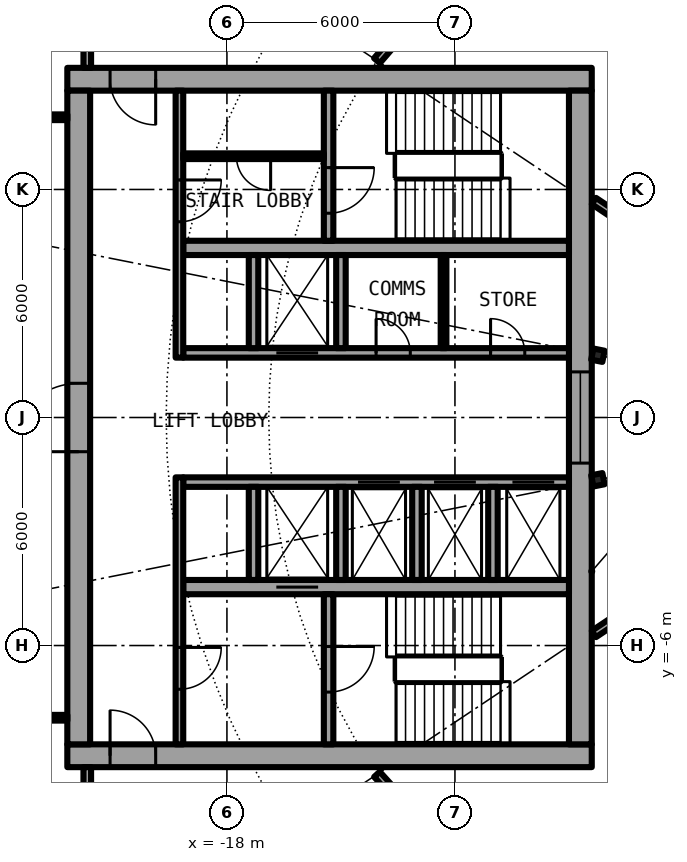
"""IFC4 building model, lengths in metres.
Left out: names, types, materials, properties, quantities, classifications, styles, units other than length and angle.
Written with IfcOpenShell. Run it as: python <this file> out.ifc"""

import sys

from ifc_helpers import new_model, si_unit, direction, frame, frame_2d, origin, origin_2d, place, context, subcontext, project, spatial, rectangle, i_section, extrude, element, fill, save


model = new_model("IFC4")
c1 = context("Model", 3, precision=1e-05, world=origin(), true_north=direction((0.0, 1.0)))
c2 = subcontext(c1, "Body", "Model", "MODEL_VIEW")
j1 = project(units=[si_unit("LENGTHUNIT", "METRE"), si_unit("PLANEANGLEUNIT", "RADIAN")], contexts=[c1])
p1 = place(None, origin())
s1 = spatial("IfcSite", under=j1, at=p1, CompositionType="ELEMENT")
p2 = place(p1, origin())
s2 = spatial("IfcBuilding", under=s1, at=p2, CompositionType="ELEMENT")
p3 = place(p2, frame((0.0, 0.0, 107.45)))
s3 = spatial("IfcBuildingStorey", under=s2, at=p3, CompositionType="ELEMENT", Elevation=107.45)
for number, where, z_axis, x_axis in (
    (1, (-8.239, 1.639, 0.0), (0.0, 0.0, 1.0), (-0.981, 0.195, 0.0)),
    (2, (-8.239, -1.639, 0.0), (0.0, 0.0, 1.0), (-0.981, -0.195, 0.0)),
):
    element("IfcColumn", number, at=place(p3, frame(where, z_axis=z_axis, x_axis=x_axis)), inside=s3, PredefinedType="COLUMN", context=c2, shape_type="SweptSolid", body=[
        extrude(i_section(OverallWidth=0.3, OverallDepth=0.3, WebThickness=0.011, FlangeThickness=0.019, FilletRadius=0.027, at=origin_2d()), origin(), (0.0, 0.0, 1.0), 4.2),
    ])
p4 = place(p3, frame((-22.2, -8.9, 0.0), z_axis=(0.0, 0.0, 1.0), x_axis=(1.0, 0.0, 0.0)))
e3 = element("IfcWall", 3, at=p4, inside=s3, PredefinedType="SHEAR", context=c2, shape_type="SweptSolid", body=[
    extrude(rectangle(XDim=13.8, YDim=0.6, at=frame_2d((6.9, 0.0))), origin(), (0.0, 0.0, 1.0), 4.2),
])
p5 = place(p4, frame((1.125, 0.0, 0.0)))
e4 = element("IfcOpeningElement", 4, at=p5, cuts=e3, PredefinedType="OPENING", context=c2, shape_type="SweptSolid", body=[
    extrude(rectangle(XDim=1.2, YDim=2.3, at=frame_2d((0.6, 1.15))), frame((0.0, 0.31, 0.0), z_axis=(0.0, -1.0, 0.0), x_axis=(1.0, 0.0, 0.0)), (0.0, 0.0, 1.0), 0.62),
])
p6 = place(p3, frame((-8.4, 8.9, 0.0), z_axis=(0.0, 0.0, 1.0), x_axis=(-1.0, 0.0, 0.0)))
e5 = element("IfcWall", 5, at=p6, inside=s3, PredefinedType="SHEAR", context=c2, shape_type="SweptSolid", body=[
    extrude(rectangle(XDim=13.8, YDim=0.6, at=frame_2d((6.9, 0.0))), origin(), (0.0, 0.0, 1.0), 4.2),
])
p7 = place(p6, frame((11.475, 0.0, 0.0)))
e6 = element("IfcOpeningElement", 6, at=p7, cuts=e5, PredefinedType="OPENING", context=c2, shape_type="SweptSolid", body=[
    extrude(rectangle(XDim=1.2, YDim=2.3, at=frame_2d((0.6, 1.15))), frame((0.0, 0.31, 0.0), z_axis=(0.0, -1.0, 0.0), x_axis=(1.0, 0.0, 0.0)), (0.0, 0.0, 1.0), 0.62),
])
p8 = place(p3, frame((-21.9, -8.6, 0.0), z_axis=(0.0, 0.0, 1.0), x_axis=(0.0, 1.0, 0.0)))
e7 = element("IfcWall", 7, at=p8, inside=s3, PredefinedType="SHEAR", context=c2, shape_type="SweptSolid", body=[
    extrude(rectangle(XDim=17.2, YDim=0.6, at=frame_2d((8.6, 0.0))), origin(), (0.0, 0.0, 1.0), 4.2),
])
p9 = place(p8, frame((7.7, 0.0, 0.0)))
e8 = element("IfcOpeningElement", 8, at=p9, cuts=e7, PredefinedType="OPENING", context=c2, shape_type="SweptSolid", body=[
    extrude(rectangle(XDim=1.8, YDim=2.3, at=frame_2d((0.9, 1.15))), frame((0.0, 0.31, 0.0), z_axis=(0.0, -1.0, 0.0), x_axis=(1.0, 0.0, 0.0)), (0.0, 0.0, 1.0), 0.62),
])
p10 = place(p3, frame((-8.7, 8.6, 0.0), z_axis=(0.0, 0.0, 1.0), x_axis=(0.0, -1.0, 0.0)))
e9 = element("IfcWall", 9, at=p10, inside=s3, PredefinedType="SHEAR", context=c2, shape_type="SweptSolid", body=[
    extrude(rectangle(XDim=17.2, YDim=0.6, at=frame_2d((8.6, 0.0))), origin(), (0.0, 0.0, 1.0), 4.2),
])
p11 = place(p10, frame((7.4, 0.0, 0.1)))
e10 = element("IfcOpeningElement", 10, at=p11, cuts=e9, PredefinedType="OPENING", context=c2, shape_type="SweptSolid", body=[
    extrude(rectangle(XDim=2.4, YDim=2.2, at=frame_2d((1.2, 1.1))), frame((0.0, 0.31, 0.0), z_axis=(0.0, -1.0, 0.0), x_axis=(1.0, 0.0, 0.0)), (0.0, 0.0, 1.0), 0.62),
])
p12 = place(p3, frame((-9.0, -1.7, 0.0), z_axis=(0.0, 0.0, 1.0), x_axis=(-1.0, 0.0, 0.0)))
e11 = element("IfcWall", 11, at=p12, inside=s3, PredefinedType="SHEAR", context=c2, shape_type="SweptSolid", body=[
    extrude(rectangle(XDim=10.15, YDim=0.25, at=frame_2d((5.075, 0.0))), origin(), (0.0, 0.0, 1.0), 4.2),
])
p13 = place(p12, frame((0.387, 0.0, 0.0)))
e12 = element("IfcOpeningElement", 12, at=p13, cuts=e11, PredefinedType="OPENING", context=c2, shape_type="SweptSolid", body=[
    extrude(rectangle(XDim=1.1, YDim=2.3, at=frame_2d((0.55, 1.15))), frame((0.0, 0.135, 0.0), z_axis=(0.0, -1.0, 0.0), x_axis=(1.0, 0.0, 0.0)), (0.0, 0.0, 1.0), 0.27),
])
p14 = place(p12, frame((2.45, 0.0, 0.0)))
e13 = element("IfcOpeningElement", 13, at=p14, cuts=e11, PredefinedType="OPENING", context=c2, shape_type="SweptSolid", body=[
    extrude(rectangle(XDim=1.1, YDim=2.3, at=frame_2d((0.55, 1.15))), frame((0.0, 0.135, 0.0), z_axis=(0.0, -1.0, 0.0), x_axis=(1.0, 0.0, 0.0)), (0.0, 0.0, 1.0), 0.27),
])
p15 = place(p12, frame((4.45, 0.0, 0.0)))
e14 = element("IfcOpeningElement", 14, at=p15, cuts=e11, PredefinedType="OPENING", context=c2, shape_type="SweptSolid", body=[
    extrude(rectangle(XDim=1.1, YDim=2.3, at=frame_2d((0.55, 1.15))), frame((0.0, 0.135, 0.0), z_axis=(0.0, -1.0, 0.0), x_axis=(1.0, 0.0, 0.0)), (0.0, 0.0, 1.0), 0.27),
])
p16 = place(p3, frame((-9.0, -4.462, 0.0), z_axis=(0.0, 0.0, 1.0), x_axis=(-1.0, 0.0, 0.0)))
e15 = element("IfcWall", 15, at=p16, inside=s3, PredefinedType="SHEAR", context=c2, shape_type="SweptSolid", body=[
    extrude(rectangle(XDim=10.15, YDim=0.375, at=frame_2d((5.075, 0.0))), origin(), (0.0, 0.0, 1.0), 4.2),
])
p17 = place(p16, frame((6.6, 0.0, 0.0)))
e16 = element("IfcOpeningElement", 16, at=p17, cuts=e15, PredefinedType="OPENING", context=c2, shape_type="SweptSolid", body=[
    extrude(rectangle(XDim=1.1, YDim=2.3, at=frame_2d((0.55, 1.15))), frame((0.0, 0.198, 0.0), z_axis=(0.0, -1.0, 0.0), x_axis=(1.0, 0.0, 0.0)), (0.0, 0.0, 1.0), 0.395),
])
p18 = place(p3, frame((-15.325, -4.65, 0.0), z_axis=(0.0, 0.0, 1.0), x_axis=(0.0, -1.0, 0.0)))
e17 = element("IfcWall", 17, at=p18, inside=s3, PredefinedType="SHEAR", context=c2, shape_type="SweptSolid", body=[
    extrude(rectangle(XDim=3.95, YDim=0.25, at=frame_2d((1.975, 0.0))), origin(), (0.0, 0.0, 1.0), 4.2),
])
p19 = place(p18, frame((1.375, 0.0, 0.0)))
e18 = element("IfcOpeningElement", 18, at=p19, cuts=e17, PredefinedType="OPENING", context=c2, shape_type="SweptSolid", body=[
    extrude(rectangle(XDim=1.2, YDim=2.3, at=frame_2d((0.6, 1.15))), frame((0.0, 0.135, 0.0), z_axis=(0.0, -1.0, 0.0), x_axis=(1.0, 0.0, 0.0)), (0.0, 0.0, 1.0), 0.27),
])
for number, where, z_axis, x_axis in (
    (19, (-15.0, -1.825, 0.0), (0.0, 0.0, 1.0), (0.0, -1.0, 0.0)),
    (20, (-17.3, -1.825, 0.0), (0.0, 0.0, 1.0), (0.0, -1.0, 0.0)),
):
    element("IfcWall", number, at=place(p3, frame(where, z_axis=z_axis, x_axis=x_axis)), inside=s3, PredefinedType="SOLIDWALL", context=c2, shape_type="SweptSolid", body=[
        extrude(rectangle(XDim=2.45, YDim=0.25, at=frame_2d((1.225, 0.0))), origin(), (0.0, 0.0, 1.0), 3.85),
    ])
p20 = place(p3, frame((-19.25, -1.575, 0.0), z_axis=(0.0, 0.0, 1.0), x_axis=(0.0, -1.0, 0.0)))
e21 = element("IfcWall", 21, at=p20, inside=s3, PredefinedType="SOLIDWALL", context=c2, shape_type="SweptSolid", body=[
    extrude(rectangle(XDim=7.025, YDim=0.2, at=frame_2d((3.513, 0.0))), origin(), (0.0, 0.0, 1.0), 3.85),
])
p21 = place(p20, frame((4.475, 0.0, 0.0)))
e22 = element("IfcOpeningElement", 22, at=p21, cuts=e21, PredefinedType="OPENING", context=c2, shape_type="SweptSolid", body=[
    extrude(rectangle(XDim=1.1, YDim=2.3, at=frame_2d((0.55, 1.15))), frame((0.0, 0.11, 0.0), z_axis=(0.0, -1.0, 0.0), x_axis=(1.0, 0.0, 0.0)), (0.0, 0.0, 1.0), 0.22),
])
p22 = place(p3, frame((-19.15, 1.7, 0.0), z_axis=(0.0, 0.0, 1.0), x_axis=(1.0, 0.0, 0.0)))
e23 = element("IfcWall", 23, at=p22, inside=s3, PredefinedType="SHEAR", context=c2, shape_type="SweptSolid", body=[
    extrude(rectangle(XDim=10.15, YDim=0.25, at=frame_2d((5.075, 0.0))), origin(), (0.0, 0.0, 1.0), 4.2),
])
p23 = place(p22, frame((2.45, 0.0, 0.0)))
e24 = element("IfcOpeningElement", 24, at=p23, cuts=e23, PredefinedType="OPENING", context=c2, shape_type="SweptSolid", body=[
    extrude(rectangle(XDim=1.1, YDim=2.3, at=frame_2d((0.55, 1.15))), frame((0.0, 0.135, 0.0), z_axis=(0.0, -1.0, 0.0), x_axis=(1.0, 0.0, 0.0)), (0.0, 0.0, 1.0), 0.27),
])
p24 = place(p22, frame((8.087, 0.0, 0.0)))
e25 = element("IfcOpeningElement", 25, at=p24, cuts=e23, PredefinedType="OPENING", context=c2, shape_type="SweptSolid", body=[
    extrude(rectangle(XDim=0.9, YDim=2.3, at=frame_2d((0.45, 1.15))), frame((0.0, 0.135, 0.0), z_axis=(0.0, -1.0, 0.0), x_axis=(1.0, 0.0, 0.0)), (0.0, 0.0, 1.0), 0.27),
])
p25 = place(p22, frame((5.075, 0.0, 0.0)))
e26 = element("IfcOpeningElement", 26, at=p25, cuts=e23, PredefinedType="OPENING", context=c2, shape_type="SweptSolid", body=[
    extrude(rectangle(XDim=0.9, YDim=2.3, at=frame_2d((0.45, 1.15))), frame((0.0, 0.135, 0.0), z_axis=(0.0, -1.0, 0.0), x_axis=(1.0, 0.0, 0.0)), (0.0, 0.0, 1.0), 0.27),
])
p26 = place(p3, frame((-9.0, 4.462, 0.0), z_axis=(0.0, 0.0, 1.0), x_axis=(-1.0, 0.0, 0.0)))
e27 = element("IfcWall", 27, at=p26, inside=s3, PredefinedType="SHEAR", context=c2, shape_type="SweptSolid", body=[
    extrude(rectangle(XDim=10.15, YDim=0.375, at=frame_2d((5.075, 0.0))), origin(), (0.0, 0.0, 1.0), 4.2),
])
p27 = place(p3, frame((-15.325, 8.6, 0.0), z_axis=(0.0, 0.0, 1.0), x_axis=(0.0, -1.0, 0.0)))
e28 = element("IfcWall", 28, at=p27, inside=s3, PredefinedType="SHEAR", context=c2, shape_type="SweptSolid", body=[
    extrude(rectangle(XDim=3.95, YDim=0.25, at=frame_2d((1.975, 0.0))), origin(), (0.0, 0.0, 1.0), 4.2),
])
p28 = place(p27, frame((2.025, 0.0, 0.0)))
e29 = element("IfcOpeningElement", 29, at=p28, cuts=e28, PredefinedType="OPENING", context=c2, shape_type="SweptSolid", body=[
    extrude(rectangle(XDim=1.2, YDim=2.3, at=frame_2d((0.6, 1.15))), frame((0.0, 0.135, 0.0), z_axis=(0.0, -1.0, 0.0), x_axis=(1.0, 0.0, 0.0)), (0.0, 0.0, 1.0), 0.27),
])
for number, where, z_axis, x_axis in (
    (30, (-15.0, 1.825, 0.0), (0.0, 0.0, 1.0), (0.0, 1.0, 0.0)),
    (31, (-17.3, 1.825, 0.0), (0.0, 0.0, 1.0), (0.0, 1.0, 0.0)),
):
    element("IfcWall", number, at=place(p3, frame(where, z_axis=z_axis, x_axis=x_axis)), inside=s3, PredefinedType="SOLIDWALL", context=c2, shape_type="SweptSolid", body=[
        extrude(rectangle(XDim=2.45, YDim=0.25, at=frame_2d((1.225, 0.0))), origin(), (0.0, 0.0, 1.0), 3.85),
    ])
p29 = place(p3, frame((-19.25, 8.6, 0.0), z_axis=(0.0, 0.0, 1.0), x_axis=(0.0, -1.0, 0.0)))
e32 = element("IfcWall", 32, at=p29, inside=s3, PredefinedType="SOLIDWALL", context=c2, shape_type="SweptSolid", body=[
    extrude(rectangle(XDim=7.025, YDim=0.2, at=frame_2d((3.513, 0.0))), origin(), (0.0, 0.0, 1.0), 3.85),
])
p30 = place(p29, frame((2.35, 0.0, 0.0)))
e33 = element("IfcOpeningElement", 33, at=p30, cuts=e32, PredefinedType="OPENING", context=c2, shape_type="SweptSolid", body=[
    extrude(rectangle(XDim=1.1, YDim=2.3, at=frame_2d((0.55, 1.15))), frame((0.0, 0.11, 0.0), z_axis=(0.0, -1.0, 0.0), x_axis=(1.0, 0.0, 0.0)), (0.0, 0.0, 1.0), 0.22),
])
for number, where, z_axis, x_axis in (
    (34, (-11.0, -1.825, 0.0), (0.0, 0.0, 1.0), (0.0, -1.0, 0.0)),
    (35, (-13.0, -1.825, 0.0), (0.0, 0.0, 1.0), (0.0, -1.0, 0.0)),
):
    element("IfcWall", number, at=place(p3, frame(where, z_axis=z_axis, x_axis=x_axis)), inside=s3, PredefinedType="SOLIDWALL", context=c2, shape_type="SweptSolid", body=[
        extrude(rectangle(XDim=2.45, YDim=0.25, at=frame_2d((1.225, 0.0))), origin(), (0.0, 0.0, 1.0), 3.85),
    ])
p31 = place(p3, frame((-12.3, 1.825, 0.0), z_axis=(0.0, 0.0, 1.0), x_axis=(0.0, 1.0, 0.0)))
e36 = element("IfcWall", 36, at=p31, inside=s3, PredefinedType="PARTITIONING", context=c2, shape_type="SweptSolid", body=[
    extrude(rectangle(XDim=2.45, YDim=0.15, at=frame_2d((1.225, 0.0))), origin(), (0.0, 0.0, 1.0), 3.85),
])
p32 = place(p3, frame((-15.45, 6.875, 0.0), z_axis=(0.0, 0.0, 1.0), x_axis=(-1.0, 0.0, 0.0)))
e37 = element("IfcWall", 37, at=p32, inside=s3, PredefinedType="PARTITIONING", context=c2, shape_type="SweptSolid", body=[
    extrude(rectangle(XDim=3.7, YDim=0.15, at=frame_2d((1.85, 0.0))), origin(), (0.0, 0.0, 1.0), 3.85),
])
p33 = place(p32, frame((1.4, 0.0, 0.0)))
e38 = element("IfcOpeningElement", 38, at=p33, cuts=e37, PredefinedType="OPENING", context=c2, shape_type="SweptSolid", body=[
    extrude(rectangle(XDim=0.9, YDim=2.3, at=frame_2d((0.45, 1.15))), frame((0.0, 0.085, 0.0), z_axis=(0.0, -1.0, 0.0), x_axis=(1.0, 0.0, 0.0)), (0.0, 0.0, 1.0), 0.17),
])
for number, where, z_axis, x_axis in (
    (39, (-22.2, 7.9, 0.0), (0.0, 0.0, 1.0), (-1.0, 0.0, 0.0)),
    (40, (-22.2, -7.9, 0.0), (0.0, 0.0, 1.0), (-1.0, 0.0, 0.0)),
):
    element("IfcWall", number, at=place(p3, frame(where, z_axis=z_axis, x_axis=x_axis)), inside=s3, PredefinedType="PARTITIONING", context=c2, shape_type="SweptSolid", body=[
        extrude(rectangle(XDim=2.74, YDim=0.15, at=frame_2d((1.37, 0.0))), origin(), (0.0, 0.0, 1.0), 3.85),
    ])
p34 = place(p3, frame((-14.052, -9.389, 0.0), z_axis=(0.0, 0.0, 1.0), x_axis=(0.671579385786, -0.740932607318, 0.0)))
e41 = element("IfcWall", 41, at=p34, inside=s3, PredefinedType="PARTITIONING", context=c2, shape_type="SweptSolid", body=[
    extrude(rectangle(XDim=4.96, YDim=0.2, at=frame_2d((2.48, 0.0))), origin(), (0.0, 0.0, 1.0), 3.85),
])
p35 = place(p34, frame((1.98, 0.0, 0.0)))
e42 = element("IfcOpeningElement", 42, at=p35, cuts=e41, PredefinedType="OPENING", context=c2, shape_type="SweptSolid", body=[
    extrude(rectangle(XDim=1.0, YDim=2.3, at=frame_2d((0.5, 1.15))), frame((0.0, 0.11, 0.0), z_axis=(0.0, -1.0, 0.0), x_axis=(1.0, 0.0, 0.0)), (0.0, 0.0, 1.0), 0.22),
])
p36 = place(p3, frame((-6.513, -4.472, 0.0), z_axis=(0.0, 0.0, 1.0), x_axis=(-0.831333375071, -0.555774072347, 0.0)))
e43 = element("IfcWall", 43, at=p36, inside=s3, PredefinedType="PARTITIONING", context=c2, shape_type="SweptSolid", body=[
    extrude(rectangle(XDim=2.203, YDim=0.2, at=frame_2d((1.101, 0.0))), origin(), (0.0, 0.0, 1.0), 3.85),
])
p37 = place(p3, frame((-7.969, 14.903, 0.0), z_axis=(0.0, 0.0, 1.0), x_axis=(0.471428625665, -0.881904218667, 0.0)))
e44 = element("IfcWall", 44, at=p37, inside=s3, PredefinedType="PARTITIONING", context=c2, shape_type="SweptSolid", body=[
    extrude(rectangle(XDim=9.18, YDim=0.15, at=frame_2d((4.59, 0.0))), origin(), (0.0, 0.0, 1.0), 3.85),
])
p38 = place(p3, frame((-6.513, 4.472, 0.0), z_axis=(0.0, 0.0, 1.0), x_axis=(-0.831333375071, 0.555774072347, 0.0)))
e45 = element("IfcWall", 45, at=p38, inside=s3, PredefinedType="PARTITIONING", context=c2, shape_type="SweptSolid", body=[
    extrude(rectangle(XDim=2.203, YDim=0.2, at=frame_2d((1.101, 0.0))), origin(), (0.0, 0.0, 1.0), 3.85),
])
p39 = place(p3, frame((-14.052, 9.389, 0.0), z_axis=(0.0, 0.0, 1.0), x_axis=(0.653212695939, 0.757174467256, 0.0)))
e46 = element("IfcWall", 46, at=p39, inside=s3, PredefinedType="PARTITIONING", context=c2, shape_type="SweptSolid", body=[
    extrude(rectangle(XDim=4.138, YDim=0.2, at=frame_2d((2.069, 0.0))), origin(), (0.0, 0.0, 1.0), 3.85),
])
p40 = place(p39, frame((1.569, 0.0, 0.0)))
e47 = element("IfcOpeningElement", 47, at=p40, cuts=e46, PredefinedType="OPENING", context=c2, shape_type="SweptSolid", body=[
    extrude(rectangle(XDim=1.0, YDim=2.3, at=frame_2d((0.5, 1.15))), frame((0.0, 0.11, 0.0), z_axis=(0.0, -1.0, 0.0), x_axis=(1.0, 0.0, 0.0)), (0.0, 0.0, 1.0), 0.22),
])
for number, where, z_axis, x_axis in (
    (48, (-21.675, -10.9, 0.0), (0.0, 0.0, 1.0), (0.0, 1.0, 0.0)),
    (49, (-21.675, 9.2, 0.0), (0.0, 0.0, 1.0), (0.0, 1.0, 0.0)),
):
    element("IfcWall", number, at=place(p3, frame(where, z_axis=z_axis, x_axis=x_axis)), inside=s3, PredefinedType="PARTITIONING", context=c2, shape_type="SweptSolid", body=[
        extrude(rectangle(XDim=1.7, YDim=0.2, at=frame_2d((0.85, 0.0))), origin(), (0.0, 0.0, 1.0), 3.85),
    ])
p41 = place(p13, origin())
e50 = element("IfcDoor", 50, at=p41, inside=s3, OperationType="DOUBLE_DOOR_SLIDING", PredefinedType="DOOR", context=c2, shape_type="SweptSolid", body=[
    extrude(rectangle(XDim=1.1, YDim=2.3, at=frame_2d((0.55, 1.15))), frame((0.0, 0.025, 0.0), z_axis=(0.0, -1.0, 0.0), x_axis=(1.0, 0.0, 0.0)), (0.0, 0.0, 1.0), 0.05),
])
fill(e12, e50)
p42 = place(p14, origin())
e51 = element("IfcDoor", 51, at=p42, inside=s3, OperationType="DOUBLE_DOOR_SLIDING", PredefinedType="DOOR", context=c2, shape_type="SweptSolid", body=[
    extrude(rectangle(XDim=1.1, YDim=2.3, at=frame_2d((0.55, 1.15))), frame((0.0, 0.025, 0.0), z_axis=(0.0, -1.0, 0.0), x_axis=(1.0, 0.0, 0.0)), (0.0, 0.0, 1.0), 0.05),
])
fill(e13, e51)
p43 = place(p15, origin())
e52 = element("IfcDoor", 52, at=p43, inside=s3, OperationType="DOUBLE_DOOR_SLIDING", PredefinedType="DOOR", context=c2, shape_type="SweptSolid", body=[
    extrude(rectangle(XDim=1.1, YDim=2.3, at=frame_2d((0.55, 1.15))), frame((0.0, 0.025, 0.0), z_axis=(0.0, -1.0, 0.0), x_axis=(1.0, 0.0, 0.0)), (0.0, 0.0, 1.0), 0.05),
])
fill(e14, e52)
p44 = place(p17, origin())
e53 = element("IfcDoor", 53, at=p44, inside=s3, OperationType="DOUBLE_DOOR_SLIDING", PredefinedType="DOOR", context=c2, shape_type="SweptSolid", body=[
    extrude(rectangle(XDim=1.1, YDim=2.3, at=frame_2d((0.55, 1.15))), frame((0.0, 0.025, 0.0), z_axis=(0.0, -1.0, 0.0), x_axis=(1.0, 0.0, 0.0)), (0.0, 0.0, 1.0), 0.05),
])
fill(e16, e53)
p45 = place(p23, origin())
e54 = element("IfcDoor", 54, at=p45, inside=s3, OperationType="DOUBLE_DOOR_SLIDING", PredefinedType="DOOR", context=c2, shape_type="SweptSolid", body=[
    extrude(rectangle(XDim=1.1, YDim=2.3, at=frame_2d((0.55, 1.15))), frame((0.0, 0.025, 0.0), z_axis=(0.0, -1.0, 0.0), x_axis=(1.0, 0.0, 0.0)), (0.0, 0.0, 1.0), 0.05),
])
fill(e24, e54)
p46 = place(p24, origin())
e55 = element("IfcDoor", 55, at=p46, inside=s3, OperationType="SINGLE_SWING_LEFT", PredefinedType="DOOR", context=c2, shape_type="SweptSolid", body=[
    extrude(rectangle(XDim=0.9, YDim=2.3, at=frame_2d((0.45, 1.15))), frame((0.0, 0.025, 0.0), z_axis=(0.0, -1.0, 0.0), x_axis=(1.0, 0.0, 0.0)), (0.0, 0.0, 1.0), 0.05),
])
fill(e25, e55)
p47 = place(p25, origin())
e56 = element("IfcDoor", 56, at=p47, inside=s3, OperationType="SINGLE_SWING_LEFT", PredefinedType="DOOR", context=c2, shape_type="SweptSolid", body=[
    extrude(rectangle(XDim=0.9, YDim=2.3, at=frame_2d((0.45, 1.15))), frame((0.0, 0.025, 0.0), z_axis=(0.0, -1.0, 0.0), x_axis=(1.0, 0.0, 0.0)), (0.0, 0.0, 1.0), 0.05),
])
fill(e26, e56)
p48 = place(p33, origin())
e57 = element("IfcDoor", 57, at=p48, inside=s3, OperationType="SINGLE_SWING_LEFT", PredefinedType="DOOR", context=c2, shape_type="SweptSolid", body=[
    extrude(rectangle(XDim=0.9, YDim=2.3, at=frame_2d((0.45, 1.15))), frame((0.0, 0.025, 0.0), z_axis=(0.0, -1.0, 0.0), x_axis=(1.0, 0.0, 0.0)), (0.0, 0.0, 1.0), 0.05),
])
fill(e38, e57)
p49 = place(p19, origin())
e58 = element("IfcDoor", 58, at=p49, inside=s3, OperationType="SINGLE_SWING_LEFT", PredefinedType="DOOR", context=c2, shape_type="SweptSolid", body=[
    extrude(rectangle(XDim=1.2, YDim=2.3, at=frame_2d((0.6, 1.15))), frame((0.0, 0.025, 0.0), z_axis=(0.0, -1.0, 0.0), x_axis=(1.0, 0.0, 0.0)), (0.0, 0.0, 1.0), 0.05),
])
fill(e18, e58)
p50 = place(p28, origin())
e59 = element("IfcDoor", 59, at=p50, inside=s3, OperationType="SINGLE_SWING_LEFT", PredefinedType="DOOR", context=c2, shape_type="SweptSolid", body=[
    extrude(rectangle(XDim=1.2, YDim=2.3, at=frame_2d((0.6, 1.15))), frame((0.0, 0.025, 0.0), z_axis=(0.0, -1.0, 0.0), x_axis=(1.0, 0.0, 0.0)), (0.0, 0.0, 1.0), 0.05),
])
fill(e29, e59)
p51 = place(p21, origin())
e60 = element("IfcDoor", 60, at=p51, inside=s3, OperationType="SINGLE_SWING_LEFT", PredefinedType="DOOR", context=c2, shape_type="SweptSolid", body=[
    extrude(rectangle(XDim=1.1, YDim=2.3, at=frame_2d((0.55, 1.15))), frame((0.0, 0.025, 0.0), z_axis=(0.0, -1.0, 0.0), x_axis=(1.0, 0.0, 0.0)), (0.0, 0.0, 1.0), 0.05),
])
fill(e22, e60)
p52 = place(p30, origin())
e61 = element("IfcDoor", 61, at=p52, inside=s3, OperationType="SINGLE_SWING_RIGHT", PredefinedType="DOOR", context=c2, shape_type="SweptSolid", body=[
    extrude(rectangle(XDim=1.1, YDim=2.3, at=frame_2d((0.55, 1.15))), frame((0.0, 0.025, 0.0), z_axis=(0.0, -1.0, 0.0), x_axis=(1.0, 0.0, 0.0)), (0.0, 0.0, 1.0), 0.05),
])
fill(e33, e61)
p53 = place(p5, origin())
e62 = element("IfcDoor", 62, at=p53, inside=s3, OperationType="SINGLE_SWING_RIGHT", PredefinedType="DOOR", context=c2, shape_type="SweptSolid", body=[
    extrude(rectangle(XDim=1.2, YDim=2.3, at=frame_2d((0.6, 1.15))), frame((0.0, 0.025, 0.0), z_axis=(0.0, -1.0, 0.0), x_axis=(1.0, 0.0, 0.0)), (0.0, 0.0, 1.0), 0.05),
])
fill(e4, e62)
p54 = place(p7, origin())
e63 = element("IfcDoor", 63, at=p54, inside=s3, OperationType="SINGLE_SWING_LEFT", PredefinedType="DOOR", context=c2, shape_type="SweptSolid", body=[
    extrude(rectangle(XDim=1.2, YDim=2.3, at=frame_2d((0.6, 1.15))), frame((0.0, 0.025, 0.0), z_axis=(0.0, -1.0, 0.0), x_axis=(1.0, 0.0, 0.0)), (0.0, 0.0, 1.0), 0.05),
])
fill(e6, e63)
p55 = place(p9, origin())
e64 = element("IfcDoor", 64, at=p55, inside=s3, OperationType="SINGLE_SWING_LEFT", PredefinedType="DOOR", context=c2, shape_type="SweptSolid", body=[
    extrude(rectangle(XDim=1.8, YDim=2.3, at=frame_2d((0.9, 1.15))), frame((0.0, 0.025, 0.0), z_axis=(0.0, -1.0, 0.0), x_axis=(1.0, 0.0, 0.0)), (0.0, 0.0, 1.0), 0.05),
])
fill(e8, e64)
p56 = place(p11, origin())
e65 = element("IfcWindow", 65, at=p56, inside=s3, PartitioningType="SINGLE_PANEL", PredefinedType="WINDOW", context=c2, shape_type="SweptSolid", body=[
    extrude(rectangle(XDim=2.4, YDim=2.2, at=frame_2d((1.2, 1.1))), frame((0.0, 0.03, 0.0), z_axis=(0.0, -1.0, 0.0), x_axis=(1.0, 0.0, 0.0)), (0.0, 0.0, 1.0), 0.06),
])
fill(e10, e65)
save(model, sys.argv[1])
